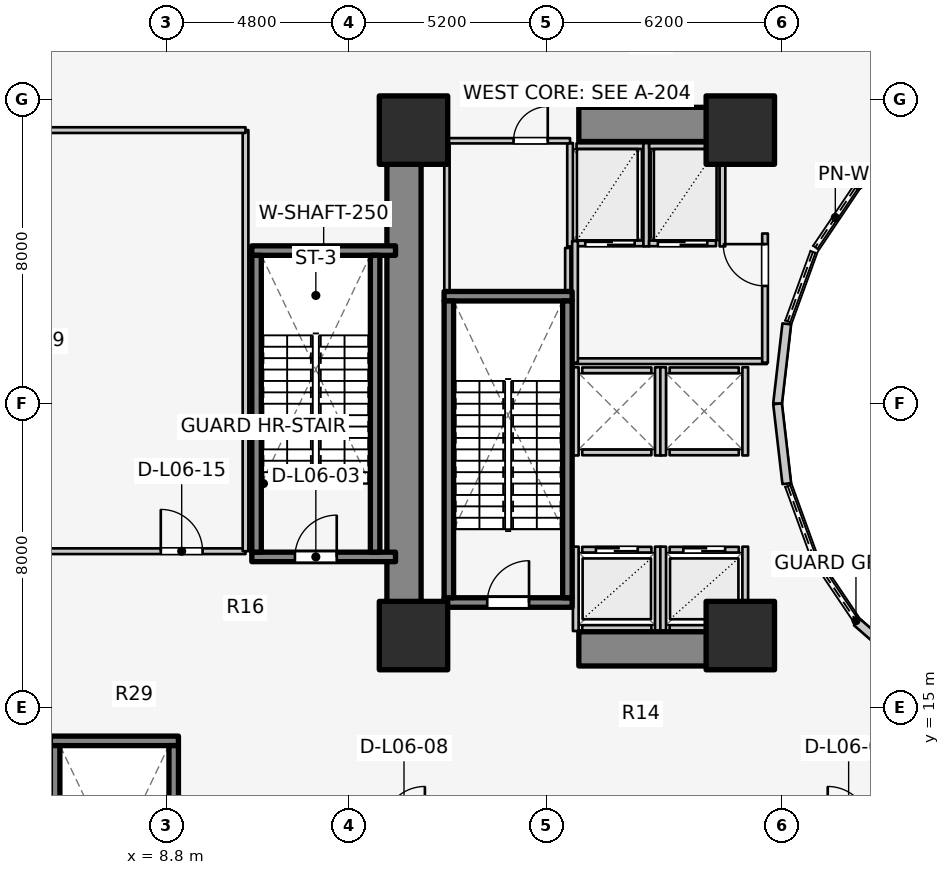
"""IFC4 building model, lengths in metres.
Left out: names, types, materials, properties, quantities, classifications, styles, units other than length and angle.
Written with IfcOpenShell. Run it as: python <this file> out.ifc"""

import sys

from ifc_helpers import new_model, si_unit, direction, frame, frame_2d, origin, origin_2d, place, context, subcontext, project, spatial, rectangle, extrude, element, fill, save


model = new_model("IFC4")
c1 = context("Model", 3, precision=1e-05, world=origin(), true_north=direction((0.0, 1.0)))
c2 = subcontext(c1, "Body", "Model", "MODEL_VIEW")
j1 = project(units=[si_unit("LENGTHUNIT", "METRE"), si_unit("PLANEANGLEUNIT", "RADIAN")], contexts=[c1])
p1 = place(None, origin())
s1 = spatial("IfcSite", under=j1, at=p1, CompositionType="ELEMENT")
p2 = place(p1, origin())
s2 = spatial("IfcBuilding", under=s1, at=p2, CompositionType="ELEMENT")
p3 = place(p2, frame((0.0, 0.0, 23.0)))
s3 = spatial("IfcBuildingStorey", under=s2, at=p3, CompositionType="ELEMENT", Elevation=23.0)
p4 = place(p3, frame((15.05, 17.05, 0.0), z_axis=(0.0, 0.0, 1.0), x_axis=(0.0, 1.0, 0.0)))
e1 = element("IfcWall", 1, at=p4, inside=s3, PredefinedType="SHEAR", context=c2, shape_type="SweptSolid", body=[
    extrude(rectangle(XDim=12.8, YDim=0.9, at=frame_2d((6.4, 0.0))), origin(), (0.0, 0.0, 1.0), 4.6),
])
for number, where, z_axis, x_axis in (
    (2, (19.65, 16.55, 0.0), (0.0, 0.0, 1.0), (1.0, 0.0, 0.0)),
    (3, (19.65, 30.35, 0.0), (0.0, 0.0, 1.0), (1.0, 0.0, 0.0)),
):
    element("IfcWall", number, at=place(p3, frame(where, z_axis=z_axis, x_axis=x_axis)), inside=s3, PredefinedType="SHEAR", context=c2, shape_type="SweptSolid", body=[
        extrude(rectangle(XDim=4.5, YDim=0.9, at=frame_2d((2.25, 0.0))), origin(), (0.0, 0.0, 1.0), 4.6),
    ])
p5 = place(p3, frame((16.105, 17.77, 0.0), z_axis=(0.0, 0.0, 1.0), x_axis=(1.0, 0.0, 0.0)))
e4 = element("IfcWall", 4, at=p5, inside=s3, PredefinedType="SOLIDWALL", context=c2, shape_type="SweptSolid", body=[
    extrude(rectangle(XDim=3.37, YDim=0.25, at=frame_2d((1.685, 0.0))), origin(), (0.0, 0.0, 1.0), 4.6),
])
p6 = place(p5, frame((1.135, 0.0, 0.0)))
e5 = element("IfcOpeningElement", 5, at=p6, cuts=e4, PredefinedType="OPENING", context=c2, shape_type="SweptSolid", body=[
    extrude(rectangle(XDim=1.1, YDim=2.1, at=frame_2d((0.55, 1.05))), frame((0.0, 0.135, 0.0), z_axis=(0.0, -1.0, 0.0), x_axis=(1.0, 0.0, 0.0)), (0.0, 0.0, 1.0), 0.27),
])
p7 = place(p3, frame((16.105, 25.83, 0.0), z_axis=(0.0, 0.0, 1.0), x_axis=(1.0, 0.0, 0.0)))
e6 = element("IfcWall", 6, at=p7, inside=s3, PredefinedType="SOLIDWALL", context=c2, shape_type="SweptSolid", body=[
    extrude(rectangle(XDim=3.37, YDim=0.25, at=frame_2d((1.685, 0.0))), origin(), (0.0, 0.0, 1.0), 4.6),
])
for number, where, z_axis, x_axis in (
    (7, (16.23, 17.895, 0.0), (0.0, 0.0, 1.0), (0.0, 1.0, 0.0)),
    (8, (19.35, 17.895, 0.0), (0.0, 0.0, 1.0), (0.0, 1.0, 0.0)),
):
    element("IfcWall", number, at=place(p3, frame(where, z_axis=z_axis, x_axis=x_axis)), inside=s3, PredefinedType="SOLIDWALL", context=c2, shape_type="SweptSolid", body=[
        extrude(rectangle(XDim=7.81, YDim=0.25, at=frame_2d((3.905, 0.0))), origin(), (0.0, 0.0, 1.0), 4.6),
    ])
p8 = place(p3, frame((11.045, 18.97, 0.0), z_axis=(0.0, 0.0, 1.0), x_axis=(1.0, 0.0, 0.0)))
e9 = element("IfcWall", 9, at=p8, inside=s3, PredefinedType="SOLIDWALL", context=c2, shape_type="SweptSolid", body=[
    extrude(rectangle(XDim=3.782, YDim=0.25, at=frame_2d((1.891, 0.0))), origin(), (0.0, 0.0, 1.0), 4.6),
])
p9 = place(p8, frame((1.135, 0.0, 0.0)))
e10 = element("IfcOpeningElement", 10, at=p9, cuts=e9, PredefinedType="OPENING", context=c2, shape_type="SweptSolid", body=[
    extrude(rectangle(XDim=1.1, YDim=2.1, at=frame_2d((0.55, 1.05))), frame((0.0, 0.135, 0.0), z_axis=(0.0, -1.0, 0.0), x_axis=(1.0, 0.0, 0.0)), (0.0, 0.0, 1.0), 0.27),
])
p10 = place(p3, frame((11.045, 27.03, 0.0), z_axis=(0.0, 0.0, 1.0), x_axis=(1.0, 0.0, 0.0)))
e11 = element("IfcWall", 11, at=p10, inside=s3, PredefinedType="SOLIDWALL", context=c2, shape_type="SweptSolid", body=[
    extrude(rectangle(XDim=3.782, YDim=0.25, at=frame_2d((1.891, 0.0))), origin(), (0.0, 0.0, 1.0), 4.6),
])
for number, where, z_axis, x_axis in (
    (12, (11.17, 19.095, 0.0), (0.0, 0.0, 1.0), (0.0, 1.0, 0.0)),
    (13, (14.29, 19.095, 0.0), (0.0, 0.0, 1.0), (0.0, 1.0, 0.0)),
):
    element("IfcWall", number, at=place(p3, frame(where, z_axis=z_axis, x_axis=x_axis)), inside=s3, PredefinedType="SOLIDWALL", context=c2, shape_type="SweptSolid", body=[
        extrude(rectangle(XDim=7.81, YDim=0.25, at=frame_2d((3.905, 0.0))), origin(), (0.0, 0.0, 1.0), 4.6),
    ])
p11 = place(p3, frame((5.745, 14.13, 0.0), z_axis=(0.0, 0.0, 1.0), x_axis=(1.0, 0.0, 0.0)))
e14 = element("IfcWall", 14, at=p11, inside=s3, PredefinedType="SOLIDWALL", context=c2, shape_type="SweptSolid", body=[
    extrude(rectangle(XDim=3.37, YDim=0.25, at=frame_2d((1.685, 0.0))), origin(), (0.0, 0.0, 1.0), 4.6),
])
for number, where, z_axis, x_axis in (
    (15, (5.87, 6.195, 0.0), (0.0, 0.0, 1.0), (0.0, 1.0, 0.0)),
    (16, (8.99, 6.195, 0.0), (0.0, 0.0, 1.0), (0.0, 1.0, 0.0)),
):
    element("IfcWall", number, at=place(p3, frame(where, z_axis=z_axis, x_axis=x_axis)), inside=s3, PredefinedType="SOLIDWALL", context=c2, shape_type="SweptSolid", body=[
        extrude(rectangle(XDim=7.81, YDim=0.25, at=frame_2d((3.905, 0.0))), origin(), (0.0, 0.0, 1.0), 4.6),
    ])
for number, where, z_axis, x_axis in (
    (17, (15.3, 16.9, 0.0), (0.0, 0.0, 1.0), (1.0, 0.0, 0.0)),
    (18, (23.9, 16.9, 0.0), (0.0, 0.0, 1.0), (1.0, 0.0, 0.0)),
    (19, (23.9, 30.2, 0.0), (0.0, 0.0, 1.0), (1.0, 0.0, 0.0)),
    (20, (15.3, 30.2, 0.0), (0.0, 0.0, 1.0), (1.0, 0.0, 0.0)),
):
    element("IfcColumn", number, at=place(p3, frame(where, z_axis=z_axis, x_axis=x_axis)), inside=s3, PredefinedType="COLUMN", context=c2, shape_type="SweptSolid", body=[
        extrude(rectangle(XDim=1.8, YDim=1.8, at=origin_2d()), origin(), (0.0, 0.0, 1.0), 4.6),
    ])
p12 = place(p3, frame((28.44, 30.032, 0.0), z_axis=(0.0, 0.0, 1.0), x_axis=(-0.752576694707, -0.658504607869, 0.0)))
e21 = element("IfcWall", 21, at=p12, inside=s3, PredefinedType="STANDARD", context=c2, shape_type="SweptSolid", body=[
    extrude(rectangle(XDim=1.959, YDim=0.23, at=frame_2d((0.98, 0.0))), origin(), (0.0, 0.0, 1.0), 2.67),
])
for number, where, z_axis, x_axis in (
    (22, (25.123, 25.102, 0.0), (0.0, 0.0, 1.0), (-0.115, -0.993, 0.0)),
    (23, (24.88, 23.0, 0.0), (0.0, 0.0, 1.0), (0.115, -0.993, 0.0)),
):
    element("IfcWall", number, at=place(p3, frame(where, z_axis=z_axis, x_axis=x_axis)), inside=s3, PredefinedType="STANDARD", context=c2, shape_type="SweptSolid", body=[
        extrude(rectangle(XDim=2.115, YDim=0.23, at=frame_2d((1.058, 0.0))), origin(), (0.0, 0.0, 1.0), 2.67),
    ])
p13 = place(p3, frame((26.965, 17.258, 0.0), z_axis=(0.0, 0.0, 1.0), x_axis=(0.752576694707, -0.658504607869, 0.0)))
e24 = element("IfcWall", 24, at=p13, inside=s3, PredefinedType="STANDARD", context=c2, shape_type="SweptSolid", body=[
    extrude(rectangle(XDim=1.959, YDim=0.23, at=frame_2d((0.98, 0.0))), origin(), (0.0, 0.0, 1.0), 2.67),
])
p14 = place(p3, frame((19.74, 19.16, 0.0), z_axis=(0.0, 0.0, 1.0), x_axis=(1.0, 0.0, 0.0)))
e25 = element("IfcWall", 25, at=p14, inside=s3, PredefinedType="SOLIDWALL", context=c2, shape_type="SweptSolid", body=[
    extrude(rectangle(XDim=1.82, YDim=0.15, at=frame_2d((0.91, 0.0))), origin(), (0.0, 0.0, 1.0), 4.075),
])
p15 = place(p14, frame((0.36, 0.0, 0.0)))
e26 = element("IfcOpeningElement", 26, at=p15, cuts=e25, PredefinedType="OPENING", context=c2, shape_type="SweptSolid", body=[
    extrude(rectangle(XDim=1.1, YDim=2.1, at=frame_2d((0.55, 1.05))), frame((0.0, 0.085, 0.0), z_axis=(0.0, -1.0, 0.0), x_axis=(1.0, 0.0, 0.0)), (0.0, 0.0, 1.0), 0.17),
])
p16 = place(p3, frame((19.74, 17.1, 0.0), z_axis=(0.0, 0.0, 1.0), x_axis=(1.0, 0.0, 0.0)))
e27 = element("IfcWall", 27, at=p16, inside=s3, PredefinedType="SOLIDWALL", context=c2, shape_type="SweptSolid", body=[
    extrude(rectangle(XDim=1.82, YDim=0.15, at=frame_2d((0.91, 0.0))), origin(), (0.0, 0.0, 1.0), 4.075),
])
p17 = place(p3, frame((19.57, 17.02, 0.0), z_axis=(0.0, 0.0, 1.0), x_axis=(0.0, 1.0, 0.0)))
e28 = element("IfcWall", 28, at=p17, inside=s3, PredefinedType="SOLIDWALL", context=c2, shape_type="SweptSolid", body=[
    extrude(rectangle(XDim=2.22, YDim=0.15, at=frame_2d((1.11, 0.0))), origin(), (0.0, 0.0, 1.0), 3.62),
])
p18 = place(p3, frame((21.73, 17.02, 0.0), z_axis=(0.0, 0.0, 1.0), x_axis=(0.0, 1.0, 0.0)))
e29 = element("IfcWall", 29, at=p18, inside=s3, PredefinedType="SOLIDWALL", context=c2, shape_type="SweptSolid", body=[
    extrude(rectangle(XDim=2.22, YDim=0.15, at=frame_2d((1.11, 0.0))), origin(), (0.0, 0.0, 1.0), 4.075),
])
p19 = place(p3, frame((22.04, 19.16, 0.0), z_axis=(0.0, 0.0, 1.0), x_axis=(1.0, 0.0, 0.0)))
e30 = element("IfcWall", 30, at=p19, inside=s3, PredefinedType="SOLIDWALL", context=c2, shape_type="SweptSolid", body=[
    extrude(rectangle(XDim=1.82, YDim=0.15, at=frame_2d((0.91, 0.0))), origin(), (0.0, 0.0, 1.0), 3.62),
])
p20 = place(p19, frame((0.36, 0.0, 0.0)))
e31 = element("IfcOpeningElement", 31, at=p20, cuts=e30, PredefinedType="OPENING", context=c2, shape_type="SweptSolid", body=[
    extrude(rectangle(XDim=1.1, YDim=2.1, at=frame_2d((0.55, 1.05))), frame((0.0, 0.085, 0.0), z_axis=(0.0, -1.0, 0.0), x_axis=(1.0, 0.0, 0.0)), (0.0, 0.0, 1.0), 0.17),
])
p21 = place(p3, frame((22.04, 17.1, 0.0), z_axis=(0.0, 0.0, 1.0), x_axis=(1.0, 0.0, 0.0)))
e32 = element("IfcWall", 32, at=p21, inside=s3, PredefinedType="SOLIDWALL", context=c2, shape_type="SweptSolid", body=[
    extrude(rectangle(XDim=1.82, YDim=0.15, at=frame_2d((0.91, 0.0))), origin(), (0.0, 0.0, 1.0), 2.67),
])
p22 = place(p3, frame((21.87, 17.02, 0.0), z_axis=(0.0, 0.0, 1.0), x_axis=(0.0, 1.0, 0.0)))
e33 = element("IfcWall", 33, at=p22, inside=s3, PredefinedType="SOLIDWALL", context=c2, shape_type="SweptSolid", body=[
    extrude(rectangle(XDim=2.22, YDim=0.15, at=frame_2d((1.11, 0.0))), origin(), (0.0, 0.0, 1.0), 4.075),
])
p23 = place(p3, frame((24.03, 17.02, 0.0), z_axis=(0.0, 0.0, 1.0), x_axis=(0.0, 1.0, 0.0)))
e34 = element("IfcWall", 34, at=p23, inside=s3, PredefinedType="SOLIDWALL", context=c2, shape_type="SweptSolid", body=[
    extrude(rectangle(XDim=2.22, YDim=0.15, at=frame_2d((1.11, 0.0))), origin(), (0.0, 0.0, 1.0), 2.67),
])
for number, where, z_axis, x_axis in (
    (35, (19.74, 21.72, 0.0), (0.0, 0.0, 1.0), (1.0, 0.0, 0.0)),
    (36, (19.74, 23.88, 0.0), (0.0, 0.0, 1.0), (1.0, 0.0, 0.0)),
):
    element("IfcWall", number, at=place(p3, frame(where, z_axis=z_axis, x_axis=x_axis)), inside=s3, PredefinedType="SOLIDWALL", context=c2, shape_type="SweptSolid", body=[
        extrude(rectangle(XDim=1.82, YDim=0.15, at=frame_2d((0.91, 0.0))), origin(), (0.0, 0.0, 1.0), 4.075),
    ])
for number, where, z_axis, x_axis in (
    (37, (19.57, 21.64, 0.0), (0.0, 0.0, 1.0), (0.0, 1.0, 0.0)),
    (38, (21.73, 21.64, 0.0), (0.0, 0.0, 1.0), (0.0, 1.0, 0.0)),
):
    element("IfcWall", number, at=place(p3, frame(where, z_axis=z_axis, x_axis=x_axis)), inside=s3, PredefinedType="SOLIDWALL", context=c2, shape_type="SweptSolid", body=[
        extrude(rectangle(XDim=2.32, YDim=0.15, at=frame_2d((1.16, 0.0))), origin(), (0.0, 0.0, 1.0), 4.075),
    ])
for number, where, z_axis, x_axis in (
    (39, (22.04, 21.72, 0.0), (0.0, 0.0, 1.0), (1.0, 0.0, 0.0)),
    (40, (22.04, 23.88, 0.0), (0.0, 0.0, 1.0), (1.0, 0.0, 0.0)),
):
    element("IfcWall", number, at=place(p3, frame(where, z_axis=z_axis, x_axis=x_axis)), inside=s3, PredefinedType="SOLIDWALL", context=c2, shape_type="SweptSolid", body=[
        extrude(rectangle(XDim=1.82, YDim=0.15, at=frame_2d((0.91, 0.0))), origin(), (0.0, 0.0, 1.0), 3.62),
    ])
p24 = place(p3, frame((21.87, 21.64, 0.0), z_axis=(0.0, 0.0, 1.0), x_axis=(0.0, 1.0, 0.0)))
e41 = element("IfcWall", 41, at=p24, inside=s3, PredefinedType="SOLIDWALL", context=c2, shape_type="SweptSolid", body=[
    extrude(rectangle(XDim=2.32, YDim=0.15, at=frame_2d((1.16, 0.0))), origin(), (0.0, 0.0, 1.0), 4.075),
])
p25 = place(p3, frame((24.03, 21.64, 0.0), z_axis=(0.0, 0.0, 1.0), x_axis=(0.0, 1.0, 0.0)))
e42 = element("IfcWall", 42, at=p25, inside=s3, PredefinedType="SOLIDWALL", context=c2, shape_type="SweptSolid", body=[
    extrude(rectangle(XDim=2.32, YDim=0.15, at=frame_2d((1.16, 0.0))), origin(), (0.0, 0.0, 1.0), 3.62),
])
p26 = place(p3, frame((19.59, 27.22, 0.0), z_axis=(0.0, 0.0, 1.0), x_axis=(1.0, 0.0, 0.0)))
e43 = element("IfcWall", 43, at=p26, inside=s3, PredefinedType="SOLIDWALL", context=c2, shape_type="SweptSolid", body=[
    extrude(rectangle(XDim=1.76, YDim=0.15, at=frame_2d((0.88, 0.0))), origin(), (0.0, 0.0, 1.0), 4.075),
])
p27 = place(p26, frame((0.23, 0.0, 0.0)))
e44 = element("IfcOpeningElement", 44, at=p27, cuts=e43, PredefinedType="OPENING", context=c2, shape_type="SweptSolid", body=[
    extrude(rectangle(XDim=1.3, YDim=2.1, at=frame_2d((0.65, 1.05))), frame((0.0, 0.085, 0.0), z_axis=(0.0, -1.0, 0.0), x_axis=(1.0, 0.0, 0.0)), (0.0, 0.0, 1.0), 0.17),
])
p28 = place(p3, frame((19.59, 29.78, 0.0), z_axis=(0.0, 0.0, 1.0), x_axis=(1.0, 0.0, 0.0)))
e45 = element("IfcWall", 45, at=p28, inside=s3, PredefinedType="SOLIDWALL", context=c2, shape_type="SweptSolid", body=[
    extrude(rectangle(XDim=1.76, YDim=0.15, at=frame_2d((0.88, 0.0))), origin(), (0.0, 0.0, 1.0), 4.075),
])
for number, where, z_axis, x_axis in (
    (46, (19.42, 27.14, 0.0), (0.0, 0.0, 1.0), (0.0, 1.0, 0.0)),
    (47, (21.425, 27.14, 0.0), (0.0, 0.0, 1.0), (0.0, 1.0, 0.0)),
):
    element("IfcWall", number, at=place(p3, frame(where, z_axis=z_axis, x_axis=x_axis)), inside=s3, PredefinedType="SOLIDWALL", context=c2, shape_type="SweptSolid", body=[
        extrude(rectangle(XDim=2.72, YDim=0.15, at=frame_2d((1.36, 0.0))), origin(), (0.0, 0.0, 1.0), 4.075),
    ])
p29 = place(p3, frame((21.5, 27.22, 0.0), z_axis=(0.0, 0.0, 1.0), x_axis=(1.0, 0.0, 0.0)))
e48 = element("IfcWall", 48, at=p29, inside=s3, PredefinedType="SOLIDWALL", context=c2, shape_type="SweptSolid", body=[
    extrude(rectangle(XDim=1.76, YDim=0.15, at=frame_2d((0.88, 0.0))), origin(), (0.0, 0.0, 1.0), 4.075),
])
p30 = place(p29, frame((0.23, 0.0, 0.0)))
e49 = element("IfcOpeningElement", 49, at=p30, cuts=e48, PredefinedType="OPENING", context=c2, shape_type="SweptSolid", body=[
    extrude(rectangle(XDim=1.3, YDim=2.1, at=frame_2d((0.65, 1.05))), frame((0.0, 0.085, 0.0), z_axis=(0.0, -1.0, 0.0), x_axis=(1.0, 0.0, 0.0)), (0.0, 0.0, 1.0), 0.17),
])
p31 = place(p3, frame((21.5, 29.78, 0.0), z_axis=(0.0, 0.0, 1.0), x_axis=(1.0, 0.0, 0.0)))
e50 = element("IfcWall", 50, at=p31, inside=s3, PredefinedType="SOLIDWALL", context=c2, shape_type="SweptSolid", body=[
    extrude(rectangle(XDim=1.76, YDim=0.15, at=frame_2d((0.88, 0.0))), origin(), (0.0, 0.0, 1.0), 4.075),
])
p32 = place(p3, frame((23.43, 27.14, 0.0), z_axis=(0.0, 0.0, 1.0), x_axis=(0.0, 1.0, 0.0)))
e51 = element("IfcWall", 51, at=p32, inside=s3, PredefinedType="SOLIDWALL", context=c2, shape_type="SweptSolid", body=[
    extrude(rectangle(XDim=2.72, YDim=0.15, at=frame_2d((1.36, 0.0))), origin(), (0.0, 0.0, 1.0), 4.075),
])
p33 = place(p3, frame((19.52, 24.12, 0.0), z_axis=(0.0, 0.0, 1.0), x_axis=(1.0, 0.0, 0.0)))
e52 = element("IfcWall", 52, at=p33, inside=s3, PredefinedType="PARTITIONING", context=c2, shape_type="SweptSolid", body=[
    extrude(rectangle(XDim=5.08, YDim=0.15, at=frame_2d((2.54, 0.0))), origin(), (0.0, 0.0, 1.0), 3.62),
])
p34 = place(p3, frame((19.55, 24.08, 0.0), z_axis=(0.0, 0.0, 1.0), x_axis=(0.0, 1.0, 0.0)))
e53 = element("IfcWall", 53, at=p34, inside=s3, PredefinedType="PARTITIONING", context=c2, shape_type="SweptSolid", body=[
    extrude(rectangle(XDim=3.2, YDim=0.15, at=frame_2d((1.6, 0.0))), origin(), (0.0, 0.0, 1.0), 4.075),
])
p35 = place(p3, frame((24.55, 24.08, 0.0), z_axis=(0.0, 0.0, 1.0), x_axis=(0.0, 1.0, 0.0)))
e54 = element("IfcWall", 54, at=p35, inside=s3, PredefinedType="PARTITIONING", context=c2, shape_type="SweptSolid", body=[
    extrude(rectangle(XDim=3.4, YDim=0.15, at=frame_2d((1.7, 0.0))), origin(), (0.0, 0.0, 1.0), 4.075),
])
p36 = place(p35, frame((2.02, 0.0, 0.0)))
e55 = element("IfcOpeningElement", 55, at=p36, cuts=e54, PredefinedType="OPENING", context=c2, shape_type="SweptSolid", body=[
    extrude(rectangle(XDim=1.1, YDim=2.1, at=frame_2d((0.55, 1.05))), frame((0.0, 0.085, 0.0), z_axis=(0.0, -1.0, 0.0), x_axis=(1.0, 0.0, 0.0)), (0.0, 0.0, 1.0), 0.17),
])
p37 = place(p3, frame((0.25, 19.12, 0.0), z_axis=(0.0, 0.0, 1.0), x_axis=(1.0, 0.0, 0.0)))
e56 = element("IfcWall", 56, at=p37, inside=s3, PredefinedType="PARTITIONING", context=c2, shape_type="SweptSolid", body=[
    extrude(rectangle(XDim=10.63, YDim=0.15, at=frame_2d((5.315, 0.0))), origin(), (0.0, 0.0, 1.0), 2.67),
])
p38 = place(p37, frame((8.4, 0.0, 0.0)))
e57 = element("IfcOpeningElement", 57, at=p38, cuts=e56, PredefinedType="OPENING", context=c2, shape_type="SweptSolid", body=[
    extrude(rectangle(XDim=1.1, YDim=2.1, at=frame_2d((0.55, 1.05))), frame((0.0, 0.085, 0.0), z_axis=(0.0, -1.0, 0.0), x_axis=(1.0, 0.0, 0.0)), (0.0, 0.0, 1.0), 0.17),
])
p39 = place(p3, frame((10.88, 19.12, 0.0), z_axis=(0.0, 0.0, 1.0), x_axis=(0.0, 1.0, 0.0)))
e58 = element("IfcWall", 58, at=p39, inside=s3, PredefinedType="PARTITIONING", context=c2, shape_type="SweptSolid", body=[
    extrude(rectangle(XDim=11.08, YDim=0.15, at=frame_2d((5.54, 0.0))), origin(), (0.0, 0.0, 1.0), 3.62),
])
p40 = place(p3, frame((0.25, 30.2, 0.0), z_axis=(0.0, 0.0, 1.0), x_axis=(1.0, 0.0, 0.0)))
e59 = element("IfcWall", 59, at=p40, inside=s3, PredefinedType="PARTITIONING", context=c2, shape_type="SweptSolid", body=[
    extrude(rectangle(XDim=10.63, YDim=0.15, at=frame_2d((5.315, 0.0))), origin(), (0.0, 0.0, 1.0), 2.67),
])
p41 = place(p3, frame((16.12, 29.92, 0.0), z_axis=(0.0, 0.0, 1.0), x_axis=(1.0, 0.0, 0.0)))
e60 = element("IfcWall", 60, at=p41, inside=s3, PredefinedType="PLUMBINGWALL", context=c2, shape_type="SweptSolid", body=[
    extrude(rectangle(XDim=3.3, YDim=0.14, at=frame_2d((1.65, 0.0))), origin(), (0.0, 0.0, 1.0), 4.075),
])
p42 = place(p41, frame((1.813, 0.0, 0.0)))
e61 = element("IfcOpeningElement", 61, at=p42, cuts=e60, PredefinedType="OPENING", context=c2, shape_type="SweptSolid", body=[
    extrude(rectangle(XDim=0.9, YDim=2.1, at=frame_2d((0.45, 1.05))), frame((0.0, 0.08, 0.0), z_axis=(0.0, -1.0, 0.0), x_axis=(1.0, 0.0, 0.0)), (0.0, 0.0, 1.0), 0.16),
])
p43 = place(p3, frame((16.18, 25.98, 0.0), z_axis=(0.0, 0.0, 1.0), x_axis=(0.0, 1.0, 0.0)))
e62 = element("IfcWall", 62, at=p43, inside=s3, PredefinedType="PLUMBINGWALL", context=c2, shape_type="SweptSolid", body=[
    extrude(rectangle(XDim=3.88, YDim=0.14, at=frame_2d((1.94, 0.0))), origin(), (0.0, 0.0, 1.0), 4.075),
])
p44 = place(p3, frame((19.36, 25.98, 0.0), z_axis=(0.0, 0.0, 1.0), x_axis=(0.0, 1.0, 0.0)))
e63 = element("IfcWall", 63, at=p44, inside=s3, PredefinedType="PLUMBINGWALL", context=c2, shape_type="SweptSolid", body=[
    extrude(rectangle(XDim=1.12, YDim=0.14, at=frame_2d((0.56, 0.0))), origin(), (0.0, 0.0, 1.0), 4.075),
])
p45 = place(p6, origin())
e64 = element("IfcDoor", 64, at=p45, inside=s3, OperationType="SINGLE_SWING_RIGHT", PredefinedType="DOOR", context=c2, shape_type="SweptSolid", body=[
    extrude(rectangle(XDim=1.1, YDim=2.1, at=frame_2d((0.55, 1.05))), frame((0.0, 0.025, 0.0), z_axis=(0.0, -1.0, 0.0), x_axis=(1.0, 0.0, 0.0)), (0.0, 0.0, 1.0), 0.05),
])
fill(e5, e64)
p46 = place(p9, origin())
e65 = element("IfcDoor", 65, at=p46, inside=s3, OperationType="SINGLE_SWING_RIGHT", PredefinedType="DOOR", context=c2, shape_type="SweptSolid", body=[
    extrude(rectangle(XDim=1.1, YDim=2.1, at=frame_2d((0.55, 1.05))), frame((0.0, 0.025, 0.0), z_axis=(0.0, -1.0, 0.0), x_axis=(1.0, 0.0, 0.0)), (0.0, 0.0, 1.0), 0.05),
])
fill(e10, e65)
p47 = place(p15, origin())
e66 = element("IfcDoor", 66, at=p47, inside=s3, OperationType="DOUBLE_DOOR_SLIDING", PredefinedType="DOOR", context=c2, shape_type="SweptSolid", body=[
    extrude(rectangle(XDim=1.1, YDim=2.1, at=frame_2d((0.55, 1.05))), frame((0.0, 0.025, 0.0), z_axis=(0.0, -1.0, 0.0), x_axis=(1.0, 0.0, 0.0)), (0.0, 0.0, 1.0), 0.05),
])
fill(e26, e66)
p48 = place(p20, origin())
e67 = element("IfcDoor", 67, at=p48, inside=s3, OperationType="DOUBLE_DOOR_SLIDING", PredefinedType="DOOR", context=c2, shape_type="SweptSolid", body=[
    extrude(rectangle(XDim=1.1, YDim=2.1, at=frame_2d((0.55, 1.05))), frame((0.0, 0.025, 0.0), z_axis=(0.0, -1.0, 0.0), x_axis=(1.0, 0.0, 0.0)), (0.0, 0.0, 1.0), 0.05),
])
fill(e31, e67)
p49 = place(p27, origin())
e68 = element("IfcDoor", 68, at=p49, inside=s3, OperationType="DOUBLE_DOOR_SLIDING", PredefinedType="DOOR", context=c2, shape_type="SweptSolid", body=[
    extrude(rectangle(XDim=1.3, YDim=2.1, at=frame_2d((0.65, 1.05))), frame((0.0, 0.025, 0.0), z_axis=(0.0, -1.0, 0.0), x_axis=(1.0, 0.0, 0.0)), (0.0, 0.0, 1.0), 0.05),
])
fill(e44, e68)
p50 = place(p30, origin())
e69 = element("IfcDoor", 69, at=p50, inside=s3, OperationType="DOUBLE_DOOR_SLIDING", PredefinedType="DOOR", context=c2, shape_type="SweptSolid", body=[
    extrude(rectangle(XDim=1.3, YDim=2.1, at=frame_2d((0.65, 1.05))), frame((0.0, 0.025, 0.0), z_axis=(0.0, -1.0, 0.0), x_axis=(1.0, 0.0, 0.0)), (0.0, 0.0, 1.0), 0.05),
])
fill(e49, e69)
p51 = place(p36, origin())
e70 = element("IfcDoor", 70, at=p51, inside=s3, OperationType="SINGLE_SWING_RIGHT", PredefinedType="DOOR", context=c2, shape_type="SweptSolid", body=[
    extrude(rectangle(XDim=1.1, YDim=2.1, at=frame_2d((0.55, 1.05))), frame((0.0, 0.025, 0.0), z_axis=(0.0, -1.0, 0.0), x_axis=(1.0, 0.0, 0.0)), (0.0, 0.0, 1.0), 0.05),
])
fill(e55, e70)
p52 = place(p38, origin())
e71 = element("IfcDoor", 71, at=p52, inside=s3, OperationType="SINGLE_SWING_LEFT", PredefinedType="DOOR", context=c2, shape_type="SweptSolid", body=[
    extrude(rectangle(XDim=1.1, YDim=2.1, at=frame_2d((0.55, 1.05))), frame((0.0, 0.025, 0.0), z_axis=(0.0, -1.0, 0.0), x_axis=(1.0, 0.0, 0.0)), (0.0, 0.0, 1.0), 0.05),
])
fill(e57, e71)
p53 = place(p42, origin())
e72 = element("IfcDoor", 72, at=p53, inside=s3, OperationType="SINGLE_SWING_RIGHT", PredefinedType="DOOR", context=c2, shape_type="SweptSolid", body=[
    extrude(rectangle(XDim=0.9, YDim=2.1, at=frame_2d((0.45, 1.05))), frame((0.0, 0.025, 0.0), z_axis=(0.0, -1.0, 0.0), x_axis=(1.0, 0.0, 0.0)), (0.0, 0.0, 1.0), 0.05),
])
fill(e61, e72)
save(model, sys.argv[1])
